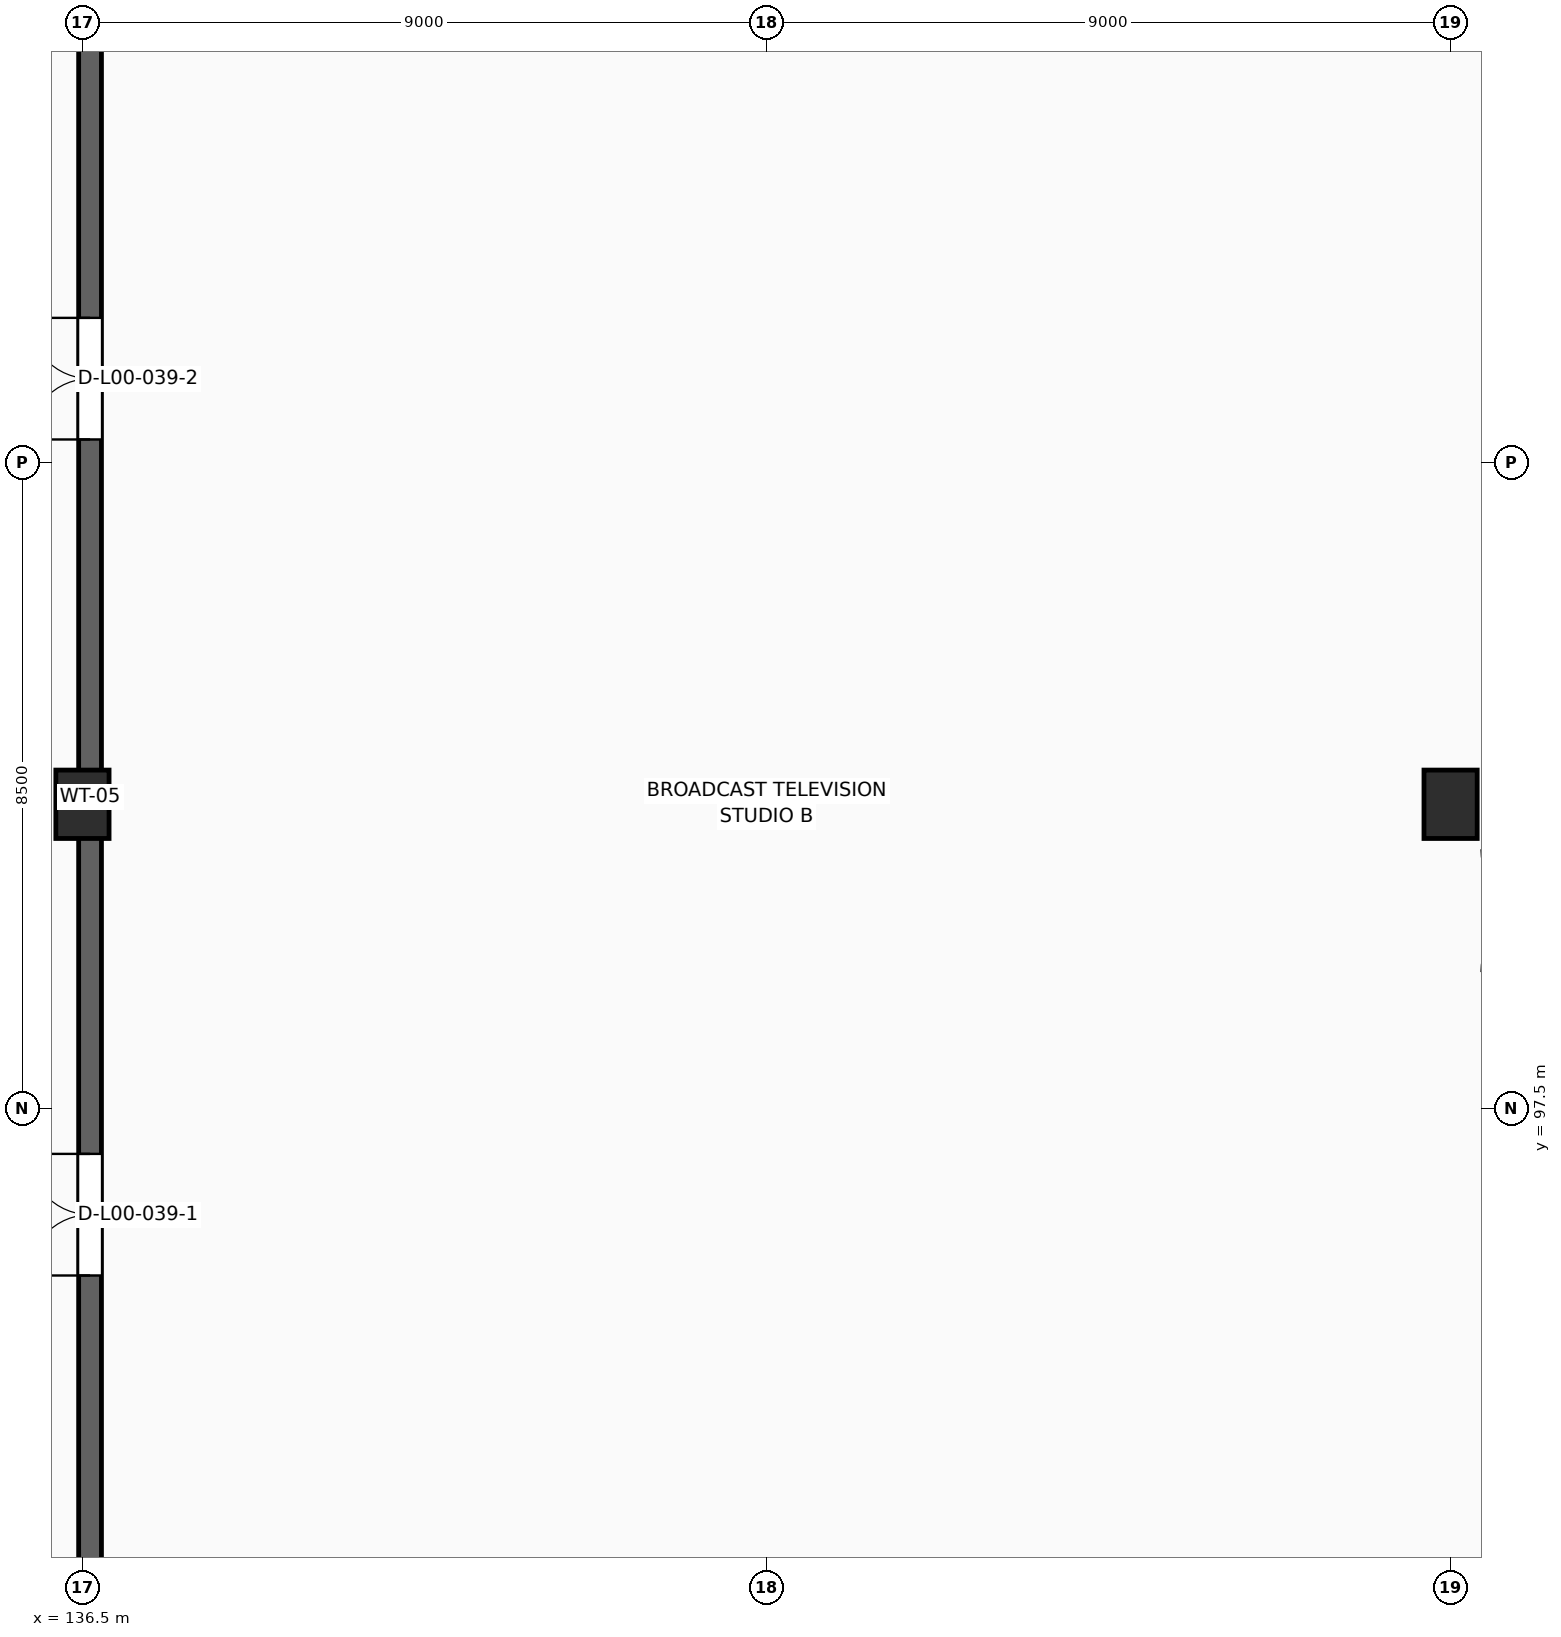
"""IFC4 building model, lengths in metres.
Left out: names, types, materials, properties, quantities, classifications, styles, units other than length and angle.
Written with IfcOpenShell. Run it as: python <this file> out.ifc"""

import sys

from ifc_helpers import new_model, si_unit, direction, frame, frame_2d, origin, origin_2d, place, context, subcontext, project, spatial, rectangle, extrude, element, fill, save


model = new_model("IFC4")
c1 = context("Model", 3, precision=1e-05, world=origin(), true_north=direction((0.0, 1.0)))
c2 = subcontext(c1, "Body", "Model", "MODEL_VIEW")
j1 = project(units=[si_unit("LENGTHUNIT", "METRE"), si_unit("PLANEANGLEUNIT", "RADIAN")], contexts=[c1])
p1 = place(None, origin())
s1 = spatial("IfcSite", under=j1, at=p1, CompositionType="ELEMENT")
p2 = place(p1, origin())
s2 = spatial("IfcBuilding", under=s1, at=p2, CompositionType="ELEMENT")
p3 = place(p2, origin())
s3 = spatial("IfcBuildingStorey", under=s2, at=p3, CompositionType="ELEMENT", Elevation=0.0)
for number, where, z_axis, x_axis in (
    (1, (136.5, 101.5, 0.0), (0.0, 0.0, 1.0), (1.0, 0.0, 0.0)),
    (2, (154.5, 101.5, 0.0), (0.0, 0.0, 1.0), (1.0, 0.0, 0.0)),
):
    element("IfcColumn", number, at=place(p3, frame(where, z_axis=z_axis, x_axis=x_axis)), inside=s3, PredefinedType="COLUMN", context=c2, shape_type="SweptSolid", body=[
        extrude(rectangle(XDim=0.7, YDim=0.9, at=origin_2d()), origin(), (0.0, 0.0, 1.0), 5.1),
    ])
p4 = place(p3, frame((136.6, 89.3, 0.0), z_axis=(0.0, 0.0, 1.0), x_axis=(0.0, 1.0, 0.0)))
e3 = element("IfcWall", 3, at=p4, inside=s3, PredefinedType="STANDARD", context=c2, shape_type="SweptSolid", body=[
    extrude(rectangle(XDim=24.3, YDim=0.3, at=frame_2d((12.15, 0.0))), origin(), (0.0, 0.0, 1.0), 5.1),
])
p5 = place(p4, frame((6.0, 0.0, 0.0)))
e4 = element("IfcOpeningElement", 4, at=p5, cuts=e3, PredefinedType="OPENING", context=c2, shape_type="SweptSolid", body=[
    extrude(rectangle(XDim=1.6, YDim=2.4, at=frame_2d((0.8, 1.2))), frame((0.0, 0.162, 0.0), z_axis=(0.0, -1.0, 0.0), x_axis=(1.0, 0.0, 0.0)), (0.0, 0.0, 1.0), 0.324),
])
p6 = place(p4, frame((17.0, 0.0, 0.0)))
e5 = element("IfcOpeningElement", 5, at=p6, cuts=e3, PredefinedType="OPENING", context=c2, shape_type="SweptSolid", body=[
    extrude(rectangle(XDim=1.6, YDim=2.4, at=frame_2d((0.8, 1.2))), frame((0.0, 0.162, 0.0), z_axis=(0.0, -1.0, 0.0), x_axis=(1.0, 0.0, 0.0)), (0.0, 0.0, 1.0), 0.324),
])
p7 = place(p5, origin())
e6 = element("IfcDoor", 6, at=p7, inside=s3, OperationType="DOUBLE_DOOR_SINGLE_SWING", PredefinedType="DOOR", context=c2, shape_type="SweptSolid", body=[
    extrude(rectangle(XDim=1.6, YDim=2.4, at=frame_2d((0.8, 1.2))), frame((0.0, 0.025, 0.0), z_axis=(0.0, -1.0, 0.0), x_axis=(1.0, 0.0, 0.0)), (0.0, 0.0, 1.0), 0.05),
])
fill(e4, e6)
p8 = place(p6, origin())
e7 = element("IfcDoor", 7, at=p8, inside=s3, OperationType="DOUBLE_DOOR_SINGLE_SWING", PredefinedType="DOOR", context=c2, shape_type="SweptSolid", body=[
    extrude(rectangle(XDim=1.6, YDim=2.4, at=frame_2d((0.8, 1.2))), frame((0.0, 0.025, 0.0), z_axis=(0.0, -1.0, 0.0), x_axis=(1.0, 0.0, 0.0)), (0.0, 0.0, 1.0), 0.05),
])
fill(e5, e7)
save(model, sys.argv[1])
